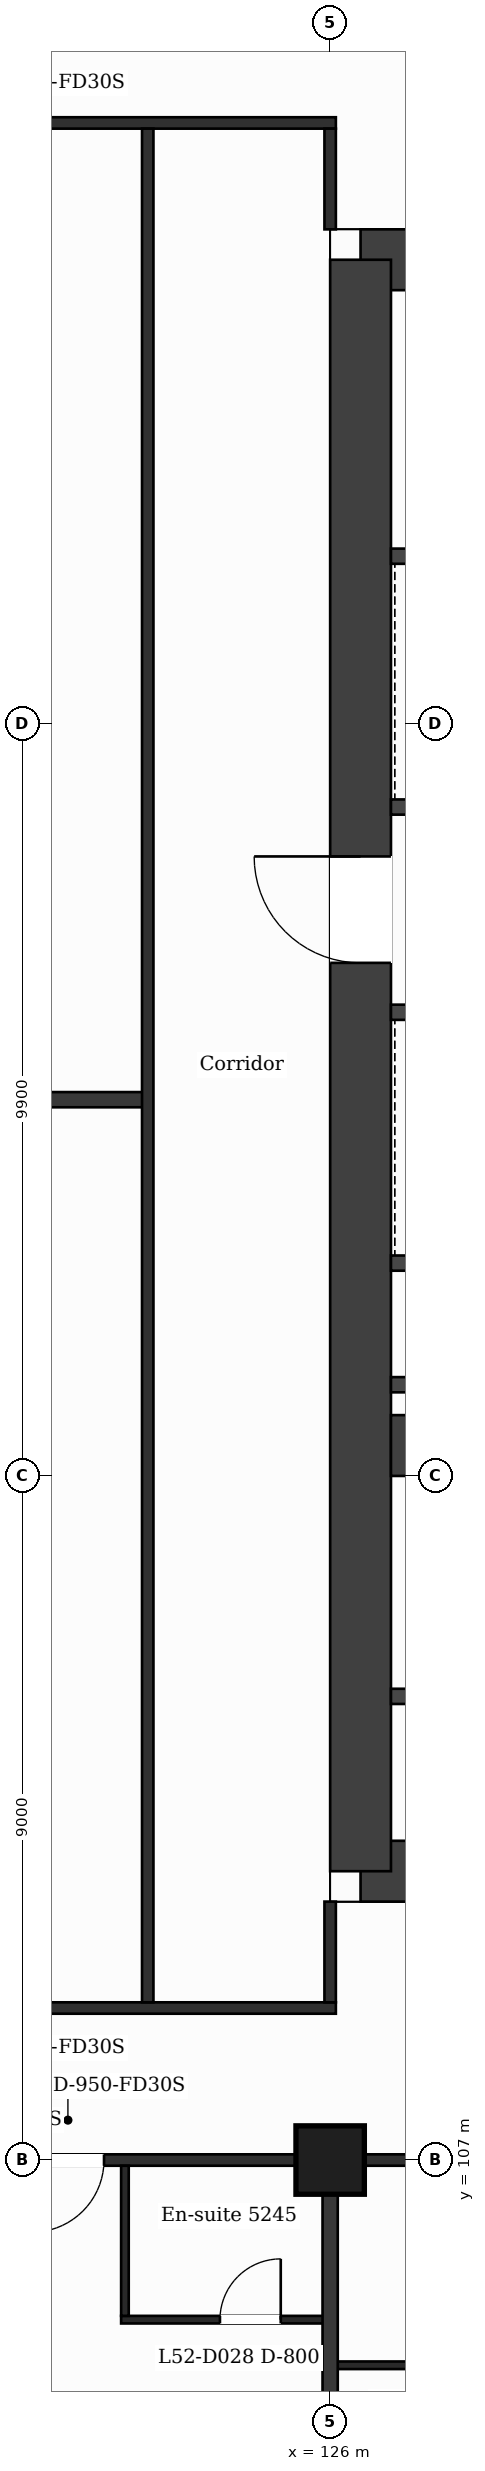
"""IFC4 building model, lengths in metres.
Left out: names, types, materials, properties, quantities, classifications, styles, units other than length and angle.
Written with IfcOpenShell. Run it as: python <this file> out.ifc"""

import sys

from ifc_helpers import new_model, si_unit, direction, frame, frame_2d, origin, origin_2d, place, context, subcontext, project, spatial, rectangle, extrude, element, fill, save


model = new_model("IFC4")
c1 = context("Model", 3, precision=1e-05, world=origin(), true_north=direction((0.0, 1.0)))
c2 = subcontext(c1, "Body", "Model", "MODEL_VIEW")
j1 = project(units=[si_unit("LENGTHUNIT", "METRE"), si_unit("PLANEANGLEUNIT", "RADIAN")], contexts=[c1])
p1 = place(None, origin())
s1 = spatial("IfcSite", under=j1, at=p1, CompositionType="ELEMENT")
p2 = place(p1, origin())
s2 = spatial("IfcBuilding", under=s1, at=p2, CompositionType="ELEMENT")
p3 = place(p2, frame((0.0, 0.0, 217.0)))
s3 = spatial("IfcBuildingStorey", under=s2, at=p3, CompositionType="ELEMENT", Elevation=217.0)
p4 = place(p3, frame((126.4, 132.0, 0.0), z_axis=(0.0, 0.0, 1.0), x_axis=(1.0, 0.0, 0.0)))
e1 = element("IfcWall", 1, at=p4, inside=s3, PredefinedType="SHEAR", context=c2, shape_type="SweptSolid", body=[
    extrude(rectangle(XDim=11.42, YDim=0.8, at=frame_2d((5.71, 0.0))), origin(), (0.0, 0.0, 1.0), 3.7),
])
p5 = place(p4, frame((3.386, 0.0, 0.0)))
e2 = element("IfcOpeningElement", 2, at=p5, cuts=e1, PredefinedType="OPENING", context=c2, shape_type="SweptSolid", body=[
    extrude(rectangle(XDim=1.2, YDim=2.1, at=frame_2d((0.6, 1.05))), frame((0.0, 0.41, 0.0), z_axis=(0.0, -1.0, 0.0), x_axis=(1.0, 0.0, 0.0)), (0.0, 0.0, 1.0), 0.82),
])
p6 = place(p3, frame((140.673, 110.8, 0.0), z_axis=(0.0, 0.0, 1.0), x_axis=(-1.0, 0.0, 0.0)))
e3 = element("IfcWall", 3, at=p6, inside=s3, PredefinedType="SHEAR", context=c2, shape_type="SweptSolid", body=[
    extrude(rectangle(XDim=14.273, YDim=0.8, at=frame_2d((7.137, 0.0))), origin(), (0.0, 0.0, 1.0), 3.7),
])
p7 = place(p6, frame((6.965, 0.0, 0.0)))
e4 = element("IfcOpeningElement", 4, at=p7, cuts=e3, PredefinedType="OPENING", context=c2, shape_type="SweptSolid", body=[
    extrude(rectangle(XDim=1.4, YDim=2.1, at=frame_2d((0.7, 1.05))), frame((0.0, 0.41, 0.0), z_axis=(0.0, -1.0, 0.0), x_axis=(1.0, 0.0, 0.0)), (0.0, 0.0, 1.0), 0.82),
])
p8 = place(p3, frame((126.4, 110.8, 0.0), z_axis=(0.0, 0.0, 1.0), x_axis=(0.0, 1.0, 0.0)))
e5 = element("IfcWall", 5, at=p8, inside=s3, PredefinedType="SHEAR", context=c2, shape_type="SweptSolid", body=[
    extrude(rectangle(XDim=21.2, YDim=0.8, at=frame_2d((10.6, 0.0))), origin(), (0.0, 0.0, 1.0), 3.7),
])
p9 = place(p8, frame((11.95, 0.0, 0.0)))
e6 = element("IfcOpeningElement", 6, at=p9, cuts=e5, PredefinedType="OPENING", context=c2, shape_type="SweptSolid", body=[
    extrude(rectangle(XDim=1.4, YDim=2.1, at=frame_2d((0.7, 1.05))), frame((0.0, 0.41, 0.0), z_axis=(0.0, -1.0, 0.0), x_axis=(1.0, 0.0, 0.0)), (0.0, 0.0, 1.0), 0.82),
])
p10 = place(p3, frame((126.8, 116.4, 0.0), z_axis=(0.0, 0.0, 1.0), x_axis=(1.0, 0.0, 0.0)))
e7 = element("IfcWall", 7, at=p10, inside=s3, PredefinedType="SHEAR", context=c2, shape_type="SweptSolid", body=[
    extrude(rectangle(XDim=5.3, YDim=0.8, at=frame_2d((2.65, 0.0))), origin(), (0.0, 0.0, 1.0), 3.7),
])
p11 = place(p3, frame((126.0, 107.0, 0.0), z_axis=(0.0, 0.0, 1.0), x_axis=(1.0, 0.0, 0.0)))
e8 = element("IfcColumn", 8, at=p11, inside=s3, PredefinedType="COLUMN", context=c2, shape_type="SweptSolid", body=[
    extrude(rectangle(XDim=0.9, YDim=0.9, at=origin_2d()), origin(), (0.0, 0.0, 1.0), 3.7),
])
p12 = place(p3, frame((126.0, 104.3, 0.0), z_axis=(0.0, 0.0, 1.0), x_axis=(1.0, 0.0, 0.0)))
e9 = element("IfcWall", 9, at=p12, inside=s3, PredefinedType="PARTITIONING", context=c2, shape_type="SweptSolid", body=[
    extrude(rectangle(XDim=2.15, YDim=0.1, at=frame_2d((1.075, 0.0))), origin(), (0.0, 0.0, 1.0), 3.38),
])
p13 = place(p3, frame((123.25, 104.9, 0.0), z_axis=(0.0, 0.0, 1.0), x_axis=(1.0, 0.0, 0.0)))
e10 = element("IfcWall", 10, at=p13, inside=s3, PredefinedType="PARTITIONING", context=c2, shape_type="SweptSolid", body=[
    extrude(rectangle(XDim=2.75, YDim=0.1, at=frame_2d((1.375, 0.0))), origin(), (0.0, 0.0, 1.0), 3.38),
])
p14 = place(p13, frame((1.3, 0.0, 0.0)))
e11 = element("IfcOpeningElement", 11, at=p14, cuts=e10, PredefinedType="OPENING", context=c2, shape_type="SweptSolid", body=[
    extrude(rectangle(XDim=0.8, YDim=2.1, at=frame_2d((0.4, 1.05))), frame((0.0, 0.06, 0.0), z_axis=(0.0, -1.0, 0.0), x_axis=(1.0, 0.0, 0.0)), (0.0, 0.0, 1.0), 0.12),
])
p15 = place(p3, frame((87.018, 107.0, 0.0), z_axis=(0.0, 0.0, 1.0), x_axis=(1.0, 0.0, 0.0)))
e12 = element("IfcWall", 12, at=p15, inside=s3, PredefinedType="PARTITIONING", context=c2, shape_type="SweptSolid", body=[
    extrude(rectangle(XDim=52.765, YDim=0.15, at=frame_2d((26.382, 0.0))), origin(), (0.0, 0.0, 1.0), 3.38),
])
p16 = place(p15, frame((1.276, 0.0, 0.0)))
e13 = element("IfcOpeningElement", 13, at=p16, cuts=e12, PredefinedType="OPENING", context=c2, shape_type="SweptSolid", body=[
    extrude(rectangle(XDim=0.95, YDim=2.1, at=frame_2d((0.475, 1.05))), frame((0.0, 0.085, 0.0), z_axis=(0.0, -1.0, 0.0), x_axis=(1.0, 0.0, 0.0)), (0.0, 0.0, 1.0), 0.17),
])
p17 = place(p15, frame((6.034, 0.0, 0.0)))
e14 = element("IfcOpeningElement", 14, at=p17, cuts=e12, PredefinedType="OPENING", context=c2, shape_type="SweptSolid", body=[
    extrude(rectangle(XDim=0.95, YDim=2.1, at=frame_2d((0.475, 1.05))), frame((0.0, 0.085, 0.0), z_axis=(0.0, -1.0, 0.0), x_axis=(1.0, 0.0, 0.0)), (0.0, 0.0, 1.0), 0.17),
])
p18 = place(p15, frame((15.445, 0.0, 0.0)))
e15 = element("IfcOpeningElement", 15, at=p18, cuts=e12, PredefinedType="OPENING", context=c2, shape_type="SweptSolid", body=[
    extrude(rectangle(XDim=0.95, YDim=2.1, at=frame_2d((0.475, 1.05))), frame((0.0, 0.085, 0.0), z_axis=(0.0, -1.0, 0.0), x_axis=(1.0, 0.0, 0.0)), (0.0, 0.0, 1.0), 0.17),
])
p19 = place(p15, frame((18.369, 0.0, 0.0)))
e16 = element("IfcOpeningElement", 16, at=p19, cuts=e12, PredefinedType="OPENING", context=c2, shape_type="SweptSolid", body=[
    extrude(rectangle(XDim=0.95, YDim=2.1, at=frame_2d((0.475, 1.05))), frame((0.0, 0.085, 0.0), z_axis=(0.0, -1.0, 0.0), x_axis=(1.0, 0.0, 0.0)), (0.0, 0.0, 1.0), 0.17),
])
p20 = place(p15, frame((24.519, 0.0, 0.0)))
e17 = element("IfcOpeningElement", 17, at=p20, cuts=e12, PredefinedType="OPENING", context=c2, shape_type="SweptSolid", body=[
    extrude(rectangle(XDim=0.95, YDim=2.1, at=frame_2d((0.475, 1.05))), frame((0.0, 0.085, 0.0), z_axis=(0.0, -1.0, 0.0), x_axis=(1.0, 0.0, 0.0)), (0.0, 0.0, 1.0), 0.17),
])
p21 = place(p15, frame((26.632, 0.0, 0.0)))
e18 = element("IfcOpeningElement", 18, at=p21, cuts=e12, PredefinedType="OPENING", context=c2, shape_type="SweptSolid", body=[
    extrude(rectangle(XDim=1.0, YDim=2.1, at=frame_2d((0.5, 1.05))), frame((0.0, 0.085, 0.0), z_axis=(0.0, -1.0, 0.0), x_axis=(1.0, 0.0, 0.0)), (0.0, 0.0, 1.0), 0.17),
])
p22 = place(p15, frame((33.422, 0.0, 0.0)))
e19 = element("IfcOpeningElement", 19, at=p22, cuts=e12, PredefinedType="OPENING", context=c2, shape_type="SweptSolid", body=[
    extrude(rectangle(XDim=0.95, YDim=2.1, at=frame_2d((0.475, 1.05))), frame((0.0, 0.085, 0.0), z_axis=(0.0, -1.0, 0.0), x_axis=(1.0, 0.0, 0.0)), (0.0, 0.0, 1.0), 0.17),
])
p23 = place(p15, frame((35.057, 0.0, 0.0)))
e20 = element("IfcOpeningElement", 20, at=p23, cuts=e12, PredefinedType="OPENING", context=c2, shape_type="SweptSolid", body=[
    extrude(rectangle(XDim=0.95, YDim=2.1, at=frame_2d((0.475, 1.05))), frame((0.0, 0.085, 0.0), z_axis=(0.0, -1.0, 0.0), x_axis=(1.0, 0.0, 0.0)), (0.0, 0.0, 1.0), 0.17),
])
p24 = place(p15, frame((44.532, 0.0, 0.0)))
e21 = element("IfcOpeningElement", 21, at=p24, cuts=e12, PredefinedType="OPENING", context=c2, shape_type="SweptSolid", body=[
    extrude(rectangle(XDim=1.0, YDim=2.1, at=frame_2d((0.5, 1.05))), frame((0.0, 0.085, 0.0), z_axis=(0.0, -1.0, 0.0), x_axis=(1.0, 0.0, 0.0)), (0.0, 0.0, 1.0), 0.17),
])
p25 = place(p15, frame((48.249, 0.0, 0.0)))
e22 = element("IfcOpeningElement", 22, at=p25, cuts=e12, PredefinedType="OPENING", context=c2, shape_type="SweptSolid", body=[
    extrude(rectangle(XDim=0.95, YDim=2.1, at=frame_2d((0.475, 1.05))), frame((0.0, 0.085, 0.0), z_axis=(0.0, -1.0, 0.0), x_axis=(1.0, 0.0, 0.0)), (0.0, 0.0, 1.0), 0.17),
])
p26 = place(p3, frame((100.725, 109.0, 0.0), z_axis=(0.0, 0.0, 1.0), x_axis=(1.0, 0.0, 0.0)))
e23 = element("IfcWall", 23, at=p26, inside=s3, PredefinedType="PARTITIONING", context=c2, shape_type="SweptSolid", body=[
    extrude(rectangle(XDim=25.35, YDim=0.15, at=frame_2d((12.675, 0.0))), origin(), (0.0, 0.0, 1.0), 3.38),
])
p27 = place(p26, frame((6.15, 0.0, 0.0)))
e24 = element("IfcOpeningElement", 24, at=p27, cuts=e23, PredefinedType="OPENING", context=c2, shape_type="SweptSolid", body=[
    extrude(rectangle(XDim=1.0, YDim=2.1, at=frame_2d((0.5, 1.05))), frame((0.0, 0.085, 0.0), z_axis=(0.0, -1.0, 0.0), x_axis=(1.0, 0.0, 0.0)), (0.0, 0.0, 1.0), 0.17),
])
p28 = place(p26, frame((3.475, 0.0, 0.0)))
e25 = element("IfcOpeningElement", 25, at=p28, cuts=e23, PredefinedType="OPENING", context=c2, shape_type="SweptSolid", body=[
    extrude(rectangle(XDim=1.0, YDim=2.1, at=frame_2d((0.5, 1.05))), frame((0.0, 0.085, 0.0), z_axis=(0.0, -1.0, 0.0), x_axis=(1.0, 0.0, 0.0)), (0.0, 0.0, 1.0), 0.17),
])
p29 = place(p26, frame((12.175, 0.0, 0.0)))
e26 = element("IfcOpeningElement", 26, at=p29, cuts=e23, PredefinedType="OPENING", context=c2, shape_type="SweptSolid", body=[
    extrude(rectangle(XDim=1.0, YDim=2.1, at=frame_2d((0.5, 1.05))), frame((0.0, 0.085, 0.0), z_axis=(0.0, -1.0, 0.0), x_axis=(1.0, 0.0, 0.0)), (0.0, 0.0, 1.0), 0.17),
])
p30 = place(p26, frame((20.45, 0.0, 0.0)))
e27 = element("IfcOpeningElement", 27, at=p30, cuts=e23, PredefinedType="OPENING", context=c2, shape_type="SweptSolid", body=[
    extrude(rectangle(XDim=1.0, YDim=2.1, at=frame_2d((0.5, 1.05))), frame((0.0, 0.085, 0.0), z_axis=(0.0, -1.0, 0.0), x_axis=(1.0, 0.0, 0.0)), (0.0, 0.0, 1.0), 0.17),
])
p31 = place(p3, frame((126.8, 113.1, 0.0), z_axis=(0.0, 0.0, 1.0), x_axis=(1.0, 0.0, 0.0)))
e28 = element("IfcWall", 28, at=p31, inside=s3, PredefinedType="PARTITIONING", context=c2, shape_type="SweptSolid", body=[
    extrude(rectangle(XDim=4.873, YDim=0.2, at=frame_2d((2.437, 0.0))), origin(), (0.0, 0.0, 1.0), 3.38),
])
p32 = place(p31, frame((1.936, 0.0, 0.0)))
e29 = element("IfcOpeningElement", 29, at=p32, cuts=e28, PredefinedType="OPENING", context=c2, shape_type="SweptSolid", body=[
    extrude(rectangle(XDim=0.9, YDim=2.1, at=frame_2d((0.45, 1.05))), frame((0.0, 0.11, 0.0), z_axis=(0.0, -1.0, 0.0), x_axis=(1.0, 0.0, 0.0)), (0.0, 0.0, 1.0), 0.22),
])
for number, where, z_axis, x_axis in (
    (30, (126.8, 117.2, 0.0), (0.0, 0.0, 1.0), (1.0, 0.0, 0.0)),
    (31, (126.8, 118.8, 0.0), (0.0, 0.0, 1.0), (1.0, 0.0, 0.0)),
):
    element("IfcWall", number, at=place(p3, frame(where, z_axis=z_axis, x_axis=x_axis)), inside=s3, PredefinedType="PARTITIONING", context=c2, shape_type="SweptSolid", body=[
        extrude(rectangle(XDim=4.773, YDim=0.2, at=frame_2d((2.386, 0.0))), origin(), (0.0, 0.0, 1.0), 3.38),
    ])
p33 = place(p3, frame((117.6, 120.95, 0.0), z_axis=(0.0, 0.0, 1.0), x_axis=(1.0, 0.0, 0.0)))
e32 = element("IfcWall", 32, at=p33, inside=s3, PredefinedType="PARTITIONING", context=c2, shape_type="SweptSolid", body=[
    extrude(rectangle(XDim=6.0, YDim=0.2, at=frame_2d((3.0, 0.0))), origin(), (0.0, 0.0, 1.0), 3.38),
])
p34 = place(p3, frame((126.8, 122.1, 0.0), z_axis=(0.0, 0.0, 1.0), x_axis=(1.0, 0.0, 0.0)))
e33 = element("IfcWall", 33, at=p34, inside=s3, PredefinedType="PARTITIONING", context=c2, shape_type="SweptSolid", body=[
    extrude(rectangle(XDim=4.773, YDim=0.2, at=frame_2d((2.386, 0.0))), origin(), (0.0, 0.0, 1.0), 3.38),
])
p35 = place(p34, frame((3.176, 0.0, 0.0)))
e34 = element("IfcOpeningElement", 34, at=p35, cuts=e33, PredefinedType="OPENING", context=c2, shape_type="SweptSolid", body=[
    extrude(rectangle(XDim=1.1, YDim=2.1, at=frame_2d((0.55, 1.05))), frame((0.0, 0.11, 0.0), z_axis=(0.0, -1.0, 0.0), x_axis=(1.0, 0.0, 0.0)), (0.0, 0.0, 1.0), 0.22),
])
p36 = place(p34, frame((0.79, 0.0, 0.0)))
e35 = element("IfcOpeningElement", 35, at=p36, cuts=e33, PredefinedType="OPENING", context=c2, shape_type="SweptSolid", body=[
    extrude(rectangle(XDim=1.1, YDim=2.1, at=frame_2d((0.55, 1.05))), frame((0.0, 0.11, 0.0), z_axis=(0.0, -1.0, 0.0), x_axis=(1.0, 0.0, 0.0)), (0.0, 0.0, 1.0), 0.22),
])
p37 = place(p3, frame((126.8, 124.8, 0.0), z_axis=(0.0, 0.0, 1.0), x_axis=(1.0, 0.0, 0.0)))
e36 = element("IfcWall", 36, at=p37, inside=s3, PredefinedType="PARTITIONING", context=c2, shape_type="SweptSolid", body=[
    extrude(rectangle(XDim=4.782, YDim=0.2, at=frame_2d((2.391, 0.0))), origin(), (0.0, 0.0, 1.0), 3.38),
])
p38 = place(p37, frame((0.498, 0.0, 0.0)))
e37 = element("IfcOpeningElement", 37, at=p38, cuts=e36, PredefinedType="OPENING", context=c2, shape_type="SweptSolid", body=[
    extrude(rectangle(XDim=1.1, YDim=2.1, at=frame_2d((0.55, 1.05))), frame((0.0, 0.11, 0.0), z_axis=(0.0, -1.0, 0.0), x_axis=(1.0, 0.0, 0.0)), (0.0, 0.0, 1.0), 0.22),
])
p39 = place(p3, frame((126.8, 128.1, 0.0), z_axis=(0.0, 0.0, 1.0), x_axis=(1.0, 0.0, 0.0)))
e38 = element("IfcWall", 38, at=p39, inside=s3, PredefinedType="PARTITIONING", context=c2, shape_type="SweptSolid", body=[
    extrude(rectangle(XDim=4.782, YDim=0.2, at=frame_2d((2.391, 0.0))), origin(), (0.0, 0.0, 1.0), 3.38),
])
p40 = place(p39, frame((3.036, 0.0, 0.0)))
e39 = element("IfcOpeningElement", 39, at=p40, cuts=e38, PredefinedType="OPENING", context=c2, shape_type="SweptSolid", body=[
    extrude(rectangle(XDim=1.1, YDim=2.1, at=frame_2d((0.55, 1.05))), frame((0.0, 0.11, 0.0), z_axis=(0.0, -1.0, 0.0), x_axis=(1.0, 0.0, 0.0)), (0.0, 0.0, 1.0), 0.22),
])
p41 = place(p3, frame((100.725, 133.8, 0.0), z_axis=(0.0, 0.0, 1.0), x_axis=(1.0, 0.0, 0.0)))
e40 = element("IfcWall", 40, at=p41, inside=s3, PredefinedType="PARTITIONING", context=c2, shape_type="SweptSolid", body=[
    extrude(rectangle(XDim=25.35, YDim=0.15, at=frame_2d((12.675, 0.0))), origin(), (0.0, 0.0, 1.0), 3.38),
])
p42 = place(p41, frame((4.545, 0.0, 0.0)))
e41 = element("IfcOpeningElement", 41, at=p42, cuts=e40, PredefinedType="OPENING", context=c2, shape_type="SweptSolid", body=[
    extrude(rectangle(XDim=1.0, YDim=2.1, at=frame_2d((0.5, 1.05))), frame((0.0, 0.085, 0.0), z_axis=(0.0, -1.0, 0.0), x_axis=(1.0, 0.0, 0.0)), (0.0, 0.0, 1.0), 0.17),
])
p43 = place(p41, frame((12.845, 0.0, 0.0)))
e42 = element("IfcOpeningElement", 42, at=p43, cuts=e40, PredefinedType="OPENING", context=c2, shape_type="SweptSolid", body=[
    extrude(rectangle(XDim=1.0, YDim=2.1, at=frame_2d((0.5, 1.05))), frame((0.0, 0.085, 0.0), z_axis=(0.0, -1.0, 0.0), x_axis=(1.0, 0.0, 0.0)), (0.0, 0.0, 1.0), 0.17),
])
p44 = place(p41, frame((20.45, 0.0, 0.0)))
e43 = element("IfcOpeningElement", 43, at=p44, cuts=e40, PredefinedType="OPENING", context=c2, shape_type="SweptSolid", body=[
    extrude(rectangle(XDim=1.0, YDim=2.1, at=frame_2d((0.5, 1.05))), frame((0.0, 0.085, 0.0), z_axis=(0.0, -1.0, 0.0), x_axis=(1.0, 0.0, 0.0)), (0.0, 0.0, 1.0), 0.17),
])
p45 = place(p3, frame((123.3, 104.95, 0.0), z_axis=(0.0, 0.0, 1.0), x_axis=(0.0, 1.0, 0.0)))
e44 = element("IfcWall", 44, at=p45, inside=s3, PredefinedType="PARTITIONING", context=c2, shape_type="SweptSolid", body=[
    extrude(rectangle(XDim=1.975, YDim=0.1, at=frame_2d((0.988, 0.0))), origin(), (0.0, 0.0, 1.0), 3.38),
])
p46 = place(p3, frame((123.6, 109.075, 0.0), z_axis=(0.0, 0.0, 1.0), x_axis=(0.0, 1.0, 0.0)))
e45 = element("IfcWall", 45, at=p46, inside=s3, PredefinedType="PARTITIONING", context=c2, shape_type="SweptSolid", body=[
    extrude(rectangle(XDim=24.65, YDim=0.15, at=frame_2d((12.325, 0.0))), origin(), (0.0, 0.0, 1.0), 3.38),
])
p47 = place(p3, frame((126.0, 99.79, 0.0), z_axis=(0.0, 0.0, 1.0), x_axis=(0.0, 1.0, 0.0)))
e46 = element("IfcWall", 46, at=p47, inside=s3, PredefinedType="PARTITIONING", context=c2, shape_type="SweptSolid", body=[
    extrude(rectangle(XDim=7.135, YDim=0.2, at=frame_2d((3.567, 0.0))), origin(), (0.0, 0.0, 1.0), 3.38),
])
p48 = place(p3, frame((126.0, 109.075, 0.0), z_axis=(0.0, 0.0, 1.0), x_axis=(0.0, 1.0, 0.0)))
e47 = element("IfcWall", 47, at=p48, inside=s3, PredefinedType="PARTITIONING", context=c2, shape_type="SweptSolid", body=[
    extrude(rectangle(XDim=1.325, YDim=0.15, at=frame_2d((0.663, 0.0))), origin(), (0.0, 0.0, 1.0), 3.38),
])
p49 = place(p3, frame((126.0, 132.4, 0.0), z_axis=(0.0, 0.0, 1.0), x_axis=(0.0, 1.0, 0.0)))
e48 = element("IfcWall", 48, at=p49, inside=s3, PredefinedType="PARTITIONING", context=c2, shape_type="SweptSolid", body=[
    extrude(rectangle(XDim=1.325, YDim=0.15, at=frame_2d((0.663, 0.0))), origin(), (0.0, 0.0, 1.0), 3.38),
])
p50 = place(p23, origin())
e49 = element("IfcDoor", 49, at=p50, inside=s3, OperationType="SINGLE_SWING_LEFT", PredefinedType="DOOR", context=c2, shape_type="SweptSolid", body=[
    extrude(rectangle(XDim=0.95, YDim=2.1, at=frame_2d((0.475, 1.05))), frame((0.0, 0.025, 0.0), z_axis=(0.0, -1.0, 0.0), x_axis=(1.0, 0.0, 0.0)), (0.0, 0.0, 1.0), 0.05),
])
fill(e20, e49)
p51 = place(p14, origin())
e50 = element("IfcDoor", 50, at=p51, inside=s3, OperationType="SINGLE_SWING_RIGHT", PredefinedType="DOOR", context=c2, shape_type="SweptSolid", body=[
    extrude(rectangle(XDim=0.8, YDim=2.1, at=frame_2d((0.4, 1.05))), frame((0.0, 0.025, 0.0), z_axis=(0.0, -1.0, 0.0), x_axis=(1.0, 0.0, 0.0)), (0.0, 0.0, 1.0), 0.05),
])
fill(e11, e50)
p52 = place(p9, origin())
e51 = element("IfcDoor", 51, at=p52, inside=s3, OperationType="SINGLE_SWING_RIGHT", PredefinedType="DOOR", context=c2, shape_type="SweptSolid", body=[
    extrude(rectangle(XDim=1.4, YDim=2.1, at=frame_2d((0.7, 1.05))), frame((0.0, 0.025, 0.0), z_axis=(0.0, -1.0, 0.0), x_axis=(1.0, 0.0, 0.0)), (0.0, 0.0, 1.0), 0.05),
])
fill(e6, e51)
save(model, sys.argv[1])
